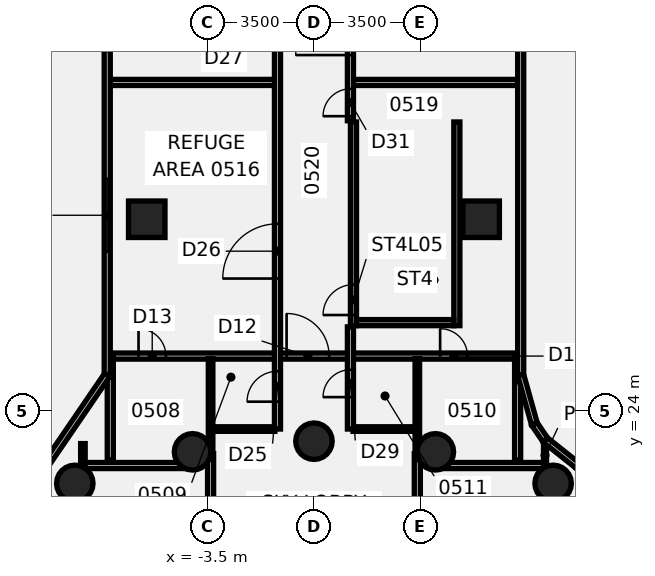
"""IFC4 building model, lengths in metres.
Left out: names, types, materials, properties, quantities, classifications, styles, units other than length and angle.
Written with IfcOpenShell. Run it as: python <this file> out.ifc"""

import sys

from ifc_helpers import new_model, si_unit, direction, frame, frame_2d, origin, origin_2d, place, context, subcontext, project, spatial, polyline, rectangle, circle, outline, extrude, element, fill, save


model = new_model("IFC4")
c1 = context("Model", 3, precision=1e-05, world=origin(), true_north=direction((0.0, 1.0)))
c2 = subcontext(c1, "Body", "Model", "MODEL_VIEW")
j1 = project(units=[si_unit("LENGTHUNIT", "METRE"), si_unit("PLANEANGLEUNIT", "RADIAN")], contexts=[c1])
p1 = place(None, origin())
s1 = spatial("IfcSite", under=j1, at=p1, CompositionType="ELEMENT")
p2 = place(p1, origin())
s2 = spatial("IfcBuilding", under=s1, at=p2, CompositionType="ELEMENT")
p3 = place(p2, frame((0.0, 0.0, 29.5)))
s3 = spatial("IfcBuildingStorey", under=s2, at=p3, CompositionType="ELEMENT", Elevation=29.5)
for number, where, z_axis, x_axis in (
    (1, (7.866, 21.613, -0.6), (0.0, 0.0, 1.0), (1.0, 0.0, 0.0)),
    (2, (3.994, 22.651, -0.6), (0.0, 0.0, 1.0), (1.0, 0.0, 0.0)),
    (3, (0.0, 23.0, -0.6), (0.0, 0.0, 1.0), (1.0, 0.0, 0.0)),
    (4, (-3.994, 22.651, -0.6), (0.0, 0.0, 1.0), (1.0, 0.0, 0.0)),
    (5, (-7.866, 21.613, -0.6), (0.0, 0.0, 1.0), (1.0, 0.0, 0.0)),
):
    element("IfcColumn", number, at=place(p3, frame(where, z_axis=z_axis, x_axis=x_axis)), inside=s3, PredefinedType="COLUMN", context=c2, shape_type="SweptSolid", body=[
        extrude(circle(Radius=0.6, at=origin_2d()), origin(), (0.0, 0.0, 1.0), 4.96),
    ])
for number, where, z_axis, x_axis in (
    (6, (-5.5, 30.3, -0.6), (0.0, 0.0, 1.0), (1.0, 0.0, 0.0)),
    (7, (5.5, 30.3, -0.6), (0.0, 0.0, 1.0), (1.0, 0.0, 0.0)),
):
    element("IfcColumn", number, at=place(p3, frame(where, z_axis=z_axis, x_axis=x_axis)), inside=s3, PredefinedType="COLUMN", context=c2, shape_type="SweptSolid", body=[
        extrude(rectangle(XDim=1.2, YDim=1.2, at=origin_2d()), origin(), (0.0, 0.0, 1.0), 4.939),
    ])
p4 = place(p3, frame((-7.54, 22.2, 0.0), z_axis=(0.0, 0.0, 1.0), x_axis=(1.0, 0.0, 0.0)))
e8 = element("IfcWall", 8, at=p4, inside=s3, PredefinedType="PARTITIONING", context=c2, shape_type="SweptSolid", body=[
    extrude(rectangle(XDim=3.413, YDim=0.2, at=frame_2d((1.707, 0.0))), origin(), (0.0, 0.0, 1.0), 3.76),
])
p5 = place(p3, frame((4.127, 22.2, 0.0), z_axis=(0.0, 0.0, 1.0), x_axis=(1.0, 0.0, 0.0)))
e9 = element("IfcWall", 9, at=p5, inside=s3, PredefinedType="PARTITIONING", context=c2, shape_type="SweptSolid", body=[
    extrude(rectangle(XDim=3.443, YDim=0.2, at=frame_2d((1.722, 0.0))), origin(), (0.0, 0.0, 1.0), 3.76),
])
p6 = place(p3, frame((-6.619, 25.8, 0.0), z_axis=(0.0, 0.0, 1.0), x_axis=(1.0, 0.0, 0.0)))
e10 = element("IfcWall", 10, at=p6, inside=s3, PredefinedType="PARTITIONING", context=c2, shape_type="SweptSolid", body=[
    extrude(rectangle(XDim=13.238, YDim=0.2, at=frame_2d((6.619, 0.0))), origin(), (0.0, 0.0, 1.0), 3.76),
])
p7 = place(p6, frame((5.719, 0.0, 0.0)))
e11 = element("IfcOpeningElement", 11, at=p7, cuts=e10, PredefinedType="OPENING", context=c2, shape_type="SweptSolid", body=[
    extrude(rectangle(XDim=1.4, YDim=2.1, at=frame_2d((0.7, 1.05))), frame((0.0, 0.11, 0.0), z_axis=(0.0, -1.0, 0.0), x_axis=(1.0, 0.0, 0.0)), (0.0, 0.0, 1.0), 0.22),
])
p8 = place(p6, frame((0.849, 0.0, 0.0)))
e12 = element("IfcOpeningElement", 12, at=p8, cuts=e10, PredefinedType="OPENING", context=c2, shape_type="SweptSolid", body=[
    extrude(rectangle(XDim=0.9, YDim=2.1, at=frame_2d((0.45, 1.05))), frame((0.0, 0.11, 0.0), z_axis=(0.0, -1.0, 0.0), x_axis=(1.0, 0.0, 0.0)), (0.0, 0.0, 1.0), 0.22),
])
p9 = place(p6, frame((10.769, 0.0, 0.0)))
e13 = element("IfcOpeningElement", 13, at=p9, cuts=e10, PredefinedType="OPENING", context=c2, shape_type="SweptSolid", body=[
    extrude(rectangle(XDim=0.9, YDim=2.1, at=frame_2d((0.45, 1.05))), frame((0.0, 0.11, 0.0), z_axis=(0.0, -1.0, 0.0), x_axis=(1.0, 0.0, 0.0)), (0.0, 0.0, 1.0), 0.22),
])
for number, where, z_axis, x_axis in (
    (14, (-6.699, 34.8, 0.0), (0.0, 0.0, 1.0), (1.0, 0.0, 0.0)),
    (15, (1.285, 34.8, 0.0), (0.0, 0.0, 1.0), (1.0, 0.0, 0.0)),
):
    element("IfcWall", number, at=place(p3, frame(where, z_axis=z_axis, x_axis=x_axis)), inside=s3, PredefinedType="PARTITIONING", context=c2, shape_type="SweptSolid", body=[
        extrude(rectangle(XDim=5.414, YDim=0.2, at=frame_2d((2.707, 0.0))), origin(), (0.0, 0.0, 1.0), 3.76),
    ])
for number, where, z_axis, x_axis in (
    (16, (-3.34, 23.4, 0.0), (0.0, 0.0, 1.0), (1.0, 0.0, 0.0)),
    (17, (1.285, 23.4, 0.0), (0.0, 0.0, 1.0), (1.0, 0.0, 0.0)),
):
    element("IfcWall", number, at=place(p3, frame(where, z_axis=z_axis, x_axis=x_axis)), inside=s3, PredefinedType="PARTITIONING", context=c2, shape_type="SweptSolid", body=[
        extrude(rectangle(XDim=2.055, YDim=0.15, at=frame_2d((1.028, 0.0))), origin(), (0.0, 0.0, 1.0), 3.76),
    ])
p10 = place(p3, frame((-7.6, 22.152, 0.0), z_axis=(0.0, 0.0, 1.0), x_axis=(0.0, 1.0, 0.0)))
e18 = element("IfcWall", 18, at=p10, inside=s3, PredefinedType="PARTITIONING", context=c2, shape_type="SweptSolid", body=[
    extrude(rectangle(XDim=0.77, YDim=0.15, at=frame_2d((0.385, 0.0))), origin(), (0.0, 0.0, 1.0), 3.76),
])
p11 = place(p3, frame((-3.4, 11.98, 0.0), z_axis=(0.0, 0.0, 1.0), x_axis=(0.0, 1.0, 0.0)))
e19 = element("IfcWall", 19, at=p11, inside=s3, PredefinedType="PARTITIONING", context=c2, shape_type="SweptSolid", body=[
    extrude(rectangle(XDim=10.611, YDim=0.2, at=frame_2d((5.305, 0.0))), origin(), (0.0, 0.0, 1.0), 3.76),
])
p12 = place(p11, frame((5.77, 0.0, 0.0)))
e20 = element("IfcOpeningElement", 20, at=p12, cuts=e19, PredefinedType="OPENING", context=c2, shape_type="SweptSolid", body=[
    extrude(rectangle(XDim=1.4, YDim=2.1, at=frame_2d((0.7, 1.05))), frame((0.0, 0.11, 0.0), z_axis=(0.0, -1.0, 0.0), x_axis=(1.0, 0.0, 0.0)), (0.0, 0.0, 1.0), 0.22),
])
p13 = place(p3, frame((-3.4, 22.711, 0.0), z_axis=(0.0, 0.0, 1.0), x_axis=(0.0, 1.0, 0.0)))
e21 = element("IfcWall", 21, at=p13, inside=s3, PredefinedType="PARTITIONING", context=c2, shape_type="SweptSolid", body=[
    extrude(rectangle(XDim=3.004, YDim=0.15, at=frame_2d((1.502, 0.0))), origin(), (0.0, 0.0, 1.0), 3.76),
])
p14 = place(p3, frame((-1.2, 23.4, 0.0), z_axis=(0.0, 0.0, 1.0), x_axis=(0.0, 1.0, 0.0)))
e22 = element("IfcWall", 22, at=p14, inside=s3, PredefinedType="PARTITIONING", context=c2, shape_type="SweptSolid", body=[
    extrude(rectangle(XDim=15.82, YDim=0.2, at=frame_2d((7.91, 0.0))), origin(), (0.0, 0.0, 1.0), 3.76),
])
p15 = place(p14, frame((0.9, 0.0, 0.0)))
e23 = element("IfcOpeningElement", 23, at=p15, cuts=e22, PredefinedType="OPENING", context=c2, shape_type="SweptSolid", body=[
    extrude(rectangle(XDim=1.0, YDim=2.1, at=frame_2d((0.5, 1.05))), frame((0.0, 0.11, 0.0), z_axis=(0.0, -1.0, 0.0), x_axis=(1.0, 0.0, 0.0)), (0.0, 0.0, 1.0), 0.22),
])
p16 = place(p14, frame((4.95, 0.0, 0.0)))
e24 = element("IfcOpeningElement", 24, at=p16, cuts=e22, PredefinedType="OPENING", context=c2, shape_type="SweptSolid", body=[
    extrude(rectangle(XDim=1.8, YDim=2.1, at=frame_2d((0.9, 1.05))), frame((0.0, 0.11, 0.0), z_axis=(0.0, -1.0, 0.0), x_axis=(1.0, 0.0, 0.0)), (0.0, 0.0, 1.0), 0.22),
])
p17 = place(p14, frame((13.05, 0.0, 0.0)))
e25 = element("IfcOpeningElement", 25, at=p17, cuts=e22, PredefinedType="OPENING", context=c2, shape_type="SweptSolid", body=[
    extrude(rectangle(XDim=1.8, YDim=2.1, at=frame_2d((0.9, 1.05))), frame((0.0, 0.11, 0.0), z_axis=(0.0, -1.0, 0.0), x_axis=(1.0, 0.0, 0.0)), (0.0, 0.0, 1.0), 0.22),
])
p18 = place(p3, frame((1.2, 23.4, 0.0), z_axis=(0.0, 0.0, 1.0), x_axis=(0.0, 1.0, 0.0)))
e26 = element("IfcWall", 26, at=p18, inside=s3, PredefinedType="PARTITIONING", context=c2, shape_type="SweptSolid", body=[
    extrude(rectangle(XDim=3.36, YDim=0.2, at=frame_2d((1.68, 0.0))), origin(), (0.0, 0.0, 1.0), 3.76),
])
p19 = place(p18, frame((1.05, 0.0, 0.0)))
e27 = element("IfcOpeningElement", 27, at=p19, cuts=e26, PredefinedType="OPENING", context=c2, shape_type="SweptSolid", body=[
    extrude(rectangle(XDim=0.9, YDim=2.1, at=frame_2d((0.45, 1.05))), frame((0.0, 0.11, 0.0), z_axis=(0.0, -1.0, 0.0), x_axis=(1.0, 0.0, 0.0)), (0.0, 0.0, 1.0), 0.22),
])
p20 = place(p3, frame((1.2, 33.54, 0.0), z_axis=(0.0, 0.0, 1.0), x_axis=(0.0, 1.0, 0.0)))
e28 = element("IfcWall", 28, at=p20, inside=s3, PredefinedType="PARTITIONING", context=c2, shape_type="SweptSolid", body=[
    extrude(rectangle(XDim=5.68, YDim=0.2, at=frame_2d((2.84, 0.0))), origin(), (0.0, 0.0, 1.0), 3.76),
])
p21 = place(p20, frame((2.16, 0.0, 0.0)))
e29 = element("IfcOpeningElement", 29, at=p21, cuts=e28, PredefinedType="OPENING", context=c2, shape_type="SweptSolid", body=[
    extrude(rectangle(XDim=1.8, YDim=2.1, at=frame_2d((0.9, 1.05))), frame((0.0, 0.11, 0.0), z_axis=(0.0, -1.0, 0.0), x_axis=(1.0, 0.0, 0.0)), (0.0, 0.0, 1.0), 0.22),
])
p22 = place(p20, frame((0.15, 0.0, 0.0)))
e30 = element("IfcOpeningElement", 30, at=p22, cuts=e28, PredefinedType="OPENING", context=c2, shape_type="SweptSolid", body=[
    extrude(rectangle(XDim=0.9, YDim=2.1, at=frame_2d((0.45, 1.05))), frame((0.0, 0.11, 0.0), z_axis=(0.0, -1.0, 0.0), x_axis=(1.0, 0.0, 0.0)), (0.0, 0.0, 1.0), 0.22),
])
p23 = place(p3, frame((3.4, 11.98, 0.0), z_axis=(0.0, 0.0, 1.0), x_axis=(0.0, 1.0, 0.0)))
e31 = element("IfcWall", 31, at=p23, inside=s3, PredefinedType="PARTITIONING", context=c2, shape_type="SweptSolid", body=[
    extrude(rectangle(XDim=10.611, YDim=0.2, at=frame_2d((5.305, 0.0))), origin(), (0.0, 0.0, 1.0), 3.76),
])
p24 = place(p23, frame((3.07, 0.0, 0.0)))
e32 = element("IfcOpeningElement", 32, at=p24, cuts=e31, PredefinedType="OPENING", context=c2, shape_type="SweptSolid", body=[
    extrude(rectangle(XDim=1.4, YDim=2.1, at=frame_2d((0.7, 1.05))), frame((0.0, 0.11, 0.0), z_axis=(0.0, -1.0, 0.0), x_axis=(1.0, 0.0, 0.0)), (0.0, 0.0, 1.0), 0.22),
])
p25 = place(p3, frame((3.4, 22.711, 0.0), z_axis=(0.0, 0.0, 1.0), x_axis=(0.0, 1.0, 0.0)))
e33 = element("IfcWall", 33, at=p25, inside=s3, PredefinedType="PARTITIONING", context=c2, shape_type="SweptSolid", body=[
    extrude(rectangle(XDim=3.004, YDim=0.15, at=frame_2d((1.502, 0.0))), origin(), (0.0, 0.0, 1.0), 3.76),
])
p26 = place(p3, frame((7.6, 22.152, 0.0), z_axis=(0.0, 0.0, 1.0), x_axis=(0.0, 1.0, 0.0)))
e34 = element("IfcWall", 34, at=p26, inside=s3, PredefinedType="PARTITIONING", context=c2, shape_type="SweptSolid", body=[
    extrude(rectangle(XDim=0.769, YDim=0.1, at=frame_2d((0.385, 0.0))), origin(), (0.0, 0.0, 1.0), 3.76),
])
for number, where, z_axis, x_axis in (
    (35, (-6.699, 25.8, 0.0), (0.0, 0.0, 1.0), (0.0, -1.0, 0.0)),
    (36, (6.699, 25.8, 0.0), (0.0, 0.0, 1.0), (0.0, -1.0, 0.0)),
):
    element("IfcWall", number, at=place(p3, frame(where, z_axis=z_axis, x_axis=x_axis)), inside=s3, PredefinedType="PARTITIONING", context=c2, shape_type="SweptSolid", body=[
        extrude(rectangle(XDim=3.42, YDim=0.2, at=frame_2d((1.71, 0.0))), origin(), (0.0, 0.0, 1.0), 3.76),
    ])
p27 = place(p3, frame((8.687, 22.185, 0.0), z_axis=(0.0, 0.0, 1.0), x_axis=(-0.782754463559, 0.62233065952, 0.0)))
e37 = element("IfcWall", 37, at=p27, inside=s3, PredefinedType="SOLIDWALL", context=c2, shape_type="SweptSolid", body=[
    extrude(rectangle(XDim=1.374, YDim=0.2, at=frame_2d((0.687, 0.0))), origin(), (0.0, 0.0, 1.0), 4.36),
])
p28 = place(p3, frame((7.611, 23.041, 0.0), z_axis=(0.0, 0.0, 1.0), x_axis=(-0.564082170033, 0.825718659987, 0.0)))
e38 = element("IfcWall", 38, at=p28, inside=s3, PredefinedType="SOLIDWALL", context=c2, shape_type="SweptSolid", body=[
    extrude(rectangle(XDim=0.64, YDim=0.2, at=frame_2d((0.32, 0.0))), origin(), (0.0, 0.0, 1.0), 4.36),
])
p29 = place(p3, frame((7.25, 23.569, 0.0), z_axis=(0.0, 0.0, 1.0), x_axis=(-0.268802114608, 0.963195423153, 0.0)))
e39 = element("IfcWall", 39, at=p29, inside=s3, PredefinedType="SOLIDWALL", context=c2, shape_type="SweptSolid", body=[
    extrude(rectangle(XDim=1.674, YDim=0.2, at=frame_2d((0.837, 0.0))), origin(), (0.0, 0.0, 1.0), 4.36),
])
p30 = place(p3, frame((6.8, 25.181, 0.0), z_axis=(0.0, 0.0, 1.0), x_axis=(0.0, 1.0, 0.0)))
e40 = element("IfcWall", 40, at=p30, inside=s3, PredefinedType="SOLIDWALL", context=c2, shape_type="SweptSolid", body=[
    extrude(rectangle(XDim=22.3, YDim=0.2, at=frame_2d((11.15, 0.0))), origin(), (0.0, 0.0, 1.0), 4.36),
])
p31 = place(p30, frame((10.7, 0.0, 1.4)))
e41 = element("IfcOpeningElement", 41, at=p31, cuts=e40, PredefinedType="OPENING", context=c2, shape_type="SweptSolid", body=[
    extrude(rectangle(XDim=2.4, YDim=2.1, at=frame_2d((1.2, 1.05))), frame((0.0, 0.11, 0.0), z_axis=(0.0, -1.0, 0.0), x_axis=(1.0, 0.0, 0.0)), (0.0, 0.0, 1.0), 0.22),
])
p32 = place(p3, frame((-6.8, 47.481, 0.0), z_axis=(0.0, 0.0, 1.0), x_axis=(0.0, -1.0, 0.0)))
e42 = element("IfcWall", 42, at=p32, inside=s3, PredefinedType="SOLIDWALL", context=c2, shape_type="SweptSolid", body=[
    extrude(rectangle(XDim=22.3, YDim=0.2, at=frame_2d((11.15, 0.0))), origin(), (0.0, 0.0, 1.0), 4.36),
])
p33 = place(p32, frame((3.3, 0.0, 1.4)))
e43 = element("IfcOpeningElement", 43, at=p33, cuts=e42, PredefinedType="OPENING", context=c2, shape_type="SweptSolid", body=[
    extrude(rectangle(XDim=2.4, YDim=2.1, at=frame_2d((1.2, 1.05))), frame((0.0, 0.11, 0.0), z_axis=(0.0, -1.0, 0.0), x_axis=(1.0, 0.0, 0.0)), (0.0, 0.0, 1.0), 0.22),
])
p34 = place(p32, frame((15.85, 0.0, 1.4)))
e44 = element("IfcOpeningElement", 44, at=p34, cuts=e42, PredefinedType="OPENING", context=c2, shape_type="SweptSolid", body=[
    extrude(rectangle(XDim=2.4, YDim=2.1, at=frame_2d((1.2, 1.05))), frame((0.0, 0.11, 0.0), z_axis=(0.0, -1.0, 0.0), x_axis=(1.0, 0.0, 0.0)), (0.0, 0.0, 1.0), 0.22),
])
p35 = place(p32, frame((9.25, 0.0, 1.4)))
e45 = element("IfcOpeningElement", 45, at=p35, cuts=e42, PredefinedType="OPENING", context=c2, shape_type="SweptSolid", body=[
    extrude(rectangle(XDim=2.4, YDim=2.1, at=frame_2d((1.2, 1.05))), frame((0.0, 0.11, 0.0), z_axis=(0.0, -1.0, 0.0), x_axis=(1.0, 0.0, 0.0)), (0.0, 0.0, 1.0), 0.22),
])
p36 = place(p3, frame((-6.8, 25.181, 0.0), z_axis=(0.0, 0.0, 1.0), x_axis=(-0.564050059702, -0.825740594951, 0.0)))
e46 = element("IfcWall", 46, at=p36, inside=s3, PredefinedType="SOLIDWALL", context=c2, shape_type="SweptSolid", body=[
    extrude(rectangle(XDim=3.812, YDim=0.2, at=frame_2d((1.906, 0.0))), origin(), (0.0, 0.0, 1.0), 4.36),
])
p37 = place(p3, frame((1.3, 26.8, 0.0), z_axis=(0.0, 0.0, 1.0), x_axis=(0.0, 1.0, 0.0)))
e47 = element("IfcWall", 47, at=p37, inside=s3, PredefinedType="SHEAR", context=c2, shape_type="SweptSolid", body=[
    extrude(rectangle(XDim=6.7, YDim=0.2, at=frame_2d((3.35, 0.0))), origin(), (0.0, 0.0, 1.0), 3.76),
])
p38 = place(p37, frame((0.35, 0.0, 0.0)))
e48 = element("IfcOpeningElement", 48, at=p38, cuts=e47, PredefinedType="OPENING", context=c2, shape_type="SweptSolid", body=[
    extrude(rectangle(XDim=1.0, YDim=2.1, at=frame_2d((0.5, 1.05))), frame((0.0, 0.11, 0.0), z_axis=(0.0, -1.0, 0.0), x_axis=(1.0, 0.0, 0.0)), (0.0, 0.0, 1.0), 0.22),
])
p39 = place(p3, frame((4.7, 26.8, 0.0), z_axis=(0.0, 0.0, 1.0), x_axis=(0.0, 1.0, 0.0)))
e49 = element("IfcWall", 49, at=p39, inside=s3, PredefinedType="SHEAR", context=c2, shape_type="SweptSolid", body=[
    extrude(rectangle(XDim=6.7, YDim=0.2, at=frame_2d((3.35, 0.0))), origin(), (0.0, 0.0, 1.0), 3.76),
])
p40 = place(p3, frame((4.6, 26.9, 0.0), z_axis=(0.0, 0.0, 1.0), x_axis=(-1.0, 0.0, 0.0)))
e50 = element("IfcWall", 50, at=p40, inside=s3, PredefinedType="SHEAR", context=c2, shape_type="SweptSolid", body=[
    extrude(rectangle(XDim=3.2, YDim=0.2, at=frame_2d((1.6, 0.0))), origin(), (0.0, 0.0, 1.0), 3.76),
])
p41 = place(p3, origin())
e51 = element("IfcWall", 51, at=p41, inside=s3, PredefinedType="SHEAR", context=c2, shape_type="SweptSolid", body=[
    extrude(outline(polyline([(4.6, 33.3), (4.6, 33.5), (1.4, 33.5), (1.4, 33.3), (4.6, 33.3)])), origin(), (0.0, 0.0, 1.0), 3.76),
])
p42 = place(p7, frame((1.4, 0.0, 0.0), z_axis=(0.0, 0.0, 1.0), x_axis=(-1.0, 0.0, 0.0)))
e52 = element("IfcDoor", 52, at=p42, inside=s3, OperationType="DOUBLE_DOOR_SINGLE_SWING", PredefinedType="DOOR", context=c2, shape_type="SweptSolid", body=[
    extrude(rectangle(XDim=1.4, YDim=2.1, at=frame_2d((0.7, 1.05))), frame((0.0, 0.025, 0.0), z_axis=(0.0, -1.0, 0.0), x_axis=(1.0, 0.0, 0.0)), (0.0, 0.0, 1.0), 0.05),
])
fill(e11, e52)
p43 = place(p8, frame((0.9, 0.0, 0.0), z_axis=(0.0, 0.0, 1.0), x_axis=(-1.0, 0.0, 0.0)))
e53 = element("IfcDoor", 53, at=p43, inside=s3, OperationType="SINGLE_SWING_LEFT", PredefinedType="DOOR", context=c2, shape_type="SweptSolid", body=[
    extrude(rectangle(XDim=0.9, YDim=2.1, at=frame_2d((0.45, 1.05))), frame((0.0, 0.025, 0.0), z_axis=(0.0, -1.0, 0.0), x_axis=(1.0, 0.0, 0.0)), (0.0, 0.0, 1.0), 0.05),
])
fill(e12, e53)
p44 = place(p9, frame((0.9, 0.0, 0.0), z_axis=(0.0, 0.0, 1.0), x_axis=(-1.0, 0.0, 0.0)))
e54 = element("IfcDoor", 54, at=p44, inside=s3, OperationType="SINGLE_SWING_RIGHT", PredefinedType="DOOR", context=c2, shape_type="SweptSolid", body=[
    extrude(rectangle(XDim=0.9, YDim=2.1, at=frame_2d((0.45, 1.05))), frame((0.0, 0.025, 0.0), z_axis=(0.0, -1.0, 0.0), x_axis=(1.0, 0.0, 0.0)), (0.0, 0.0, 1.0), 0.05),
])
fill(e13, e54)
p45 = place(p15, origin())
e55 = element("IfcDoor", 55, at=p45, inside=s3, OperationType="SINGLE_SWING_RIGHT", PredefinedType="DOOR", context=c2, shape_type="SweptSolid", body=[
    extrude(rectangle(XDim=1.0, YDim=2.1, at=frame_2d((0.5, 1.05))), frame((0.0, 0.025, 0.0), z_axis=(0.0, -1.0, 0.0), x_axis=(1.0, 0.0, 0.0)), (0.0, 0.0, 1.0), 0.05),
])
fill(e23, e55)
p46 = place(p16, origin())
e56 = element("IfcDoor", 56, at=p46, inside=s3, OperationType="DOUBLE_DOOR_SINGLE_SWING", PredefinedType="DOOR", context=c2, shape_type="SweptSolid", body=[
    extrude(rectangle(XDim=1.8, YDim=2.1, at=frame_2d((0.9, 1.05))), frame((0.0, 0.025, 0.0), z_axis=(0.0, -1.0, 0.0), x_axis=(1.0, 0.0, 0.0)), (0.0, 0.0, 1.0), 0.05),
])
fill(e24, e56)
p47 = place(p19, frame((0.9, 0.0, 0.0), z_axis=(0.0, 0.0, 1.0), x_axis=(-1.0, 0.0, 0.0)))
e57 = element("IfcDoor", 57, at=p47, inside=s3, OperationType="SINGLE_SWING_LEFT", PredefinedType="DOOR", context=c2, shape_type="SweptSolid", body=[
    extrude(rectangle(XDim=0.9, YDim=2.1, at=frame_2d((0.45, 1.05))), frame((0.0, 0.025, 0.0), z_axis=(0.0, -1.0, 0.0), x_axis=(1.0, 0.0, 0.0)), (0.0, 0.0, 1.0), 0.05),
])
fill(e27, e57)
p48 = place(p21, frame((1.8, 0.0, 0.0), z_axis=(0.0, 0.0, 1.0), x_axis=(-1.0, 0.0, 0.0)))
e58 = element("IfcDoor", 58, at=p48, inside=s3, OperationType="DOUBLE_DOOR_SINGLE_SWING", PredefinedType="DOOR", context=c2, shape_type="SweptSolid", body=[
    extrude(rectangle(XDim=1.8, YDim=2.1, at=frame_2d((0.9, 1.05))), frame((0.0, 0.025, 0.0), z_axis=(0.0, -1.0, 0.0), x_axis=(1.0, 0.0, 0.0)), (0.0, 0.0, 1.0), 0.05),
])
fill(e29, e58)
p49 = place(p22, frame((0.9, 0.0, 0.0), z_axis=(0.0, 0.0, 1.0), x_axis=(-1.0, 0.0, 0.0)))
e59 = element("IfcDoor", 59, at=p49, inside=s3, OperationType="SINGLE_SWING_LEFT", PredefinedType="DOOR", context=c2, shape_type="SweptSolid", body=[
    extrude(rectangle(XDim=0.9, YDim=2.1, at=frame_2d((0.45, 1.05))), frame((0.0, 0.025, 0.0), z_axis=(0.0, -1.0, 0.0), x_axis=(1.0, 0.0, 0.0)), (0.0, 0.0, 1.0), 0.05),
])
fill(e30, e59)
p50 = place(p34, origin())
e60 = element("IfcWindow", 60, at=p50, inside=s3, PartitioningType="SINGLE_PANEL", PredefinedType="WINDOW", context=c2, shape_type="SweptSolid", body=[
    extrude(rectangle(XDim=2.4, YDim=2.1, at=frame_2d((1.2, 1.05))), frame((0.0, 0.03, 0.0), z_axis=(0.0, -1.0, 0.0), x_axis=(1.0, 0.0, 0.0)), (0.0, 0.0, 1.0), 0.06),
])
fill(e44, e60)
p51 = place(p38, origin())
e61 = element("IfcDoor", 61, at=p51, inside=s3, OperationType="SINGLE_SWING_LEFT", PredefinedType="DOOR", context=c2, shape_type="SweptSolid", body=[
    extrude(rectangle(XDim=1.0, YDim=2.1, at=frame_2d((0.5, 1.05))), frame((0.0, 0.025, 0.0), z_axis=(0.0, -1.0, 0.0), x_axis=(1.0, 0.0, 0.0)), (0.0, 0.0, 1.0), 0.05),
])
fill(e48, e61)
save(model, sys.argv[1])
